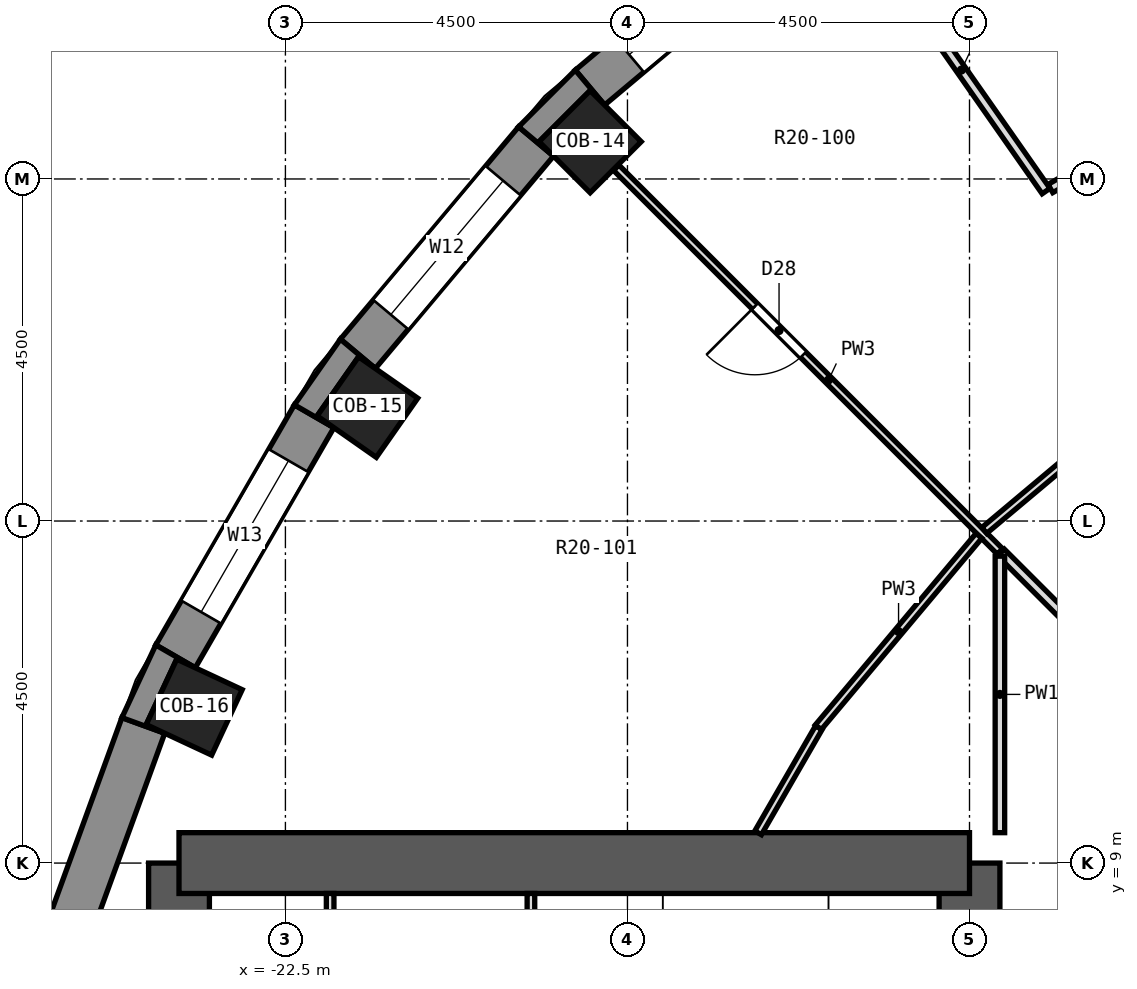
"""IFC4 building model, lengths in metres.
Left out: names, types, materials, properties, quantities, classifications, styles, units other than length and angle.
Written with IfcOpenShell. Run it as: python <this file> out.ifc"""

import sys

from ifc_helpers import new_model, si_unit, direction, frame, frame_2d, origin, origin_2d, place, context, subcontext, project, spatial, polyline, rectangle, outline, extrude, element, fill, save


model = new_model("IFC4")
c1 = context("Model", 3, precision=1e-05, world=origin(), true_north=direction((0.0, 1.0)))
c2 = subcontext(c1, "Body", "Model", "MODEL_VIEW")
j1 = project(units=[si_unit("LENGTHUNIT", "METRE"), si_unit("PLANEANGLEUNIT", "RADIAN")], contexts=[c1])
p1 = place(None, origin())
s1 = spatial("IfcSite", under=j1, at=p1, CompositionType="ELEMENT")
p2 = place(p1, origin())
s2 = spatial("IfcBuilding", under=s1, at=p2, CompositionType="ELEMENT")
p3 = place(p2, frame((0.0, 0.0, 121.6)))
s3 = spatial("IfcBuildingStorey", under=s2, at=p3, CompositionType="ELEMENT", Elevation=121.6)
for number, where, z_axis, x_axis in (
    (1, (-18.491, 18.491, 0.0), (0.0, 0.0, 1.0), (-0.707, 0.707, 0.0)),
    (2, (-21.421, 14.999, 0.0), (0.0, 0.0, 1.0), (-0.819, 0.574, 0.0)),
    (3, (-23.7, 11.052, 0.0), (0.0, 0.0, 1.0), (-0.906, 0.423, 0.0)),
):
    element("IfcColumn", number, at=place(p3, frame(where, z_axis=z_axis, x_axis=x_axis)), inside=s3, PredefinedType="COLUMN", context=c2, shape_type="SweptSolid", body=[
        extrude(rectangle(XDim=0.95, YDim=0.95, at=origin_2d()), origin(), (0.0, 0.0, 1.0), 3.3),
    ])
p4 = place(p3, frame((-13.5, -9.0, 0.0), z_axis=(0.0, 0.0, 1.0), x_axis=(0.0, 1.0, 0.0)))
e4 = element("IfcWall", 4, at=p4, inside=s3, PredefinedType="SHEAR", context=c2, shape_type="SweptSolid", body=[
    extrude(rectangle(XDim=18.0, YDim=0.8, at=frame_2d((9.0, 0.0))), origin(), (0.0, 0.0, 1.0), 3.3),
])
p5 = place(p4, frame((15.4, 0.0, 0.0)))
e5 = element("IfcOpeningElement", 5, at=p5, cuts=e4, PredefinedType="OPENING", context=c2, shape_type="SweptSolid", body=[
    extrude(rectangle(XDim=1.2, YDim=2.1, at=frame_2d((0.6, 1.05))), frame((0.0, 0.412, 0.0), z_axis=(0.0, -1.0, 0.0), x_axis=(1.0, 0.0, 0.0)), (0.0, 0.0, 1.0), 0.824),
])
p6 = place(p4, frame((1.4, 0.0, 0.0)))
e6 = element("IfcOpeningElement", 6, at=p6, cuts=e4, PredefinedType="OPENING", context=c2, shape_type="SweptSolid", body=[
    extrude(rectangle(XDim=1.2, YDim=2.1, at=frame_2d((0.6, 1.05))), frame((0.0, 0.412, 0.0), z_axis=(0.0, -1.0, 0.0), x_axis=(1.0, 0.0, 0.0)), (0.0, 0.0, 1.0), 0.824),
])
p7 = place(p4, frame((7.5, 0.0, 0.0)))
e7 = element("IfcOpeningElement", 7, at=p7, cuts=e4, PredefinedType="OPENING", context=c2, shape_type="SweptSolid", body=[
    extrude(rectangle(XDim=3.0, YDim=2.4, at=frame_2d((1.5, 1.2))), frame((0.0, 0.412, 0.0), z_axis=(0.0, -1.0, 0.0), x_axis=(1.0, 0.0, 0.0)), (0.0, 0.0, 1.0), 0.824),
])
p8 = place(p3, frame((-23.9, -9.0, 0.0), z_axis=(0.0, 0.0, 1.0), x_axis=(0.0, 1.0, 0.0)))
e8 = element("IfcWall", 8, at=p8, inside=s3, PredefinedType="SHEAR", context=c2, shape_type="SweptSolid", body=[
    extrude(rectangle(XDim=18.0, YDim=0.8, at=frame_2d((9.0, 0.0))), origin(), (0.0, 0.0, 1.0), 3.3),
])
p9 = place(p3, frame((-13.5, 9.0, 0.0), z_axis=(0.0, 0.0, 1.0), x_axis=(-1.0, 0.0, 0.0)))
e9 = element("IfcWall", 9, at=p9, inside=s3, PredefinedType="SHEAR", context=c2, shape_type="SweptSolid", body=[
    extrude(rectangle(XDim=10.4, YDim=0.8, at=frame_2d((5.2, 0.0))), origin(), (0.0, 0.0, 1.0), 3.3),
])
p10 = place(p3, frame((-15.699, 21.547, 0.0), z_axis=(0.0, 0.0, 1.0), x_axis=(-0.766055462616, -0.642774476932, 0.0)))
e10 = element("IfcWall", 10, at=p10, inside=s3, PredefinedType="SOLIDWALL", context=c2, shape_type="SweptSolid", body=[
    extrude(rectangle(XDim=3.648, YDim=0.6, at=frame_2d((1.824, 0.0))), origin(), (0.0, 0.0, 1.0), 2.8),
])
p11 = place(p10, frame((0.674, 0.0, 0.9)))
e11 = element("IfcOpeningElement", 11, at=p11, cuts=e10, PredefinedType="OPENING", context=c2, shape_type="SweptSolid", body=[
    extrude(rectangle(XDim=2.3, YDim=1.8, at=frame_2d((1.15, 0.9))), frame((0.0, 0.312, 0.0), z_axis=(0.0, -1.0, 0.0), x_axis=(1.0, 0.0, 0.0)), (0.0, 0.0, 1.0), 0.624),
])
p12 = place(p3, frame((-19.202, 18.494, 0.0), z_axis=(0.0, 0.0, 1.0), x_axis=(-0.642774476932, -0.766055462616, 0.0)))
e12 = element("IfcWall", 12, at=p12, inside=s3, PredefinedType="SOLIDWALL", context=c2, shape_type="SweptSolid", body=[
    extrude(rectangle(XDim=3.648, YDim=0.6, at=frame_2d((1.824, 0.0))), origin(), (0.0, 0.0, 1.0), 2.8),
])
p13 = place(p12, frame((0.674, 0.0, 0.9)))
e13 = element("IfcOpeningElement", 13, at=p13, cuts=e12, PredefinedType="OPENING", context=c2, shape_type="SweptSolid", body=[
    extrude(rectangle(XDim=2.3, YDim=1.8, at=frame_2d((1.15, 0.9))), frame((0.0, 0.312, 0.0), z_axis=(0.0, -1.0, 0.0), x_axis=(1.0, 0.0, 0.0)), (0.0, 0.0, 1.0), 0.624),
])
p14 = place(p3, frame((-22.122, 14.878, 0.0), z_axis=(0.0, 0.0, 1.0), x_axis=(-0.499954196102, -0.866051847062, 0.0)))
e14 = element("IfcWall", 14, at=p14, inside=s3, PredefinedType="SOLIDWALL", context=c2, shape_type="SweptSolid", body=[
    extrude(rectangle(XDim=3.648, YDim=0.6, at=frame_2d((1.824, 0.0))), origin(), (0.0, 0.0, 1.0), 2.8),
])
p15 = place(p14, frame((0.674, 0.0, 0.9)))
e15 = element("IfcOpeningElement", 15, at=p15, cuts=e14, PredefinedType="OPENING", context=c2, shape_type="SweptSolid", body=[
    extrude(rectangle(XDim=2.3, YDim=1.8, at=frame_2d((1.15, 0.9))), frame((0.0, 0.312, 0.0), z_axis=(0.0, -1.0, 0.0), x_axis=(1.0, 0.0, 0.0)), (0.0, 0.0, 1.0), 0.624),
])
p16 = place(p3, frame((-24.369, 10.811, 0.0), z_axis=(0.0, 0.0, 1.0), x_axis=(-0.341990236633, -0.939703505393, 0.0)))
e16 = element("IfcWall", 16, at=p16, inside=s3, PredefinedType="SOLIDWALL", context=c2, shape_type="SweptSolid", body=[
    extrude(rectangle(XDim=3.648, YDim=0.6, at=frame_2d((1.824, 0.0))), origin(), (0.0, 0.0, 1.0), 2.8),
])
p17 = place(p3, origin())
e17 = element("IfcWall", 17, at=p17, inside=s3, PredefinedType="SOLIDWALL", context=c2, shape_type="SweptSolid", body=[
    extrude(outline(polyline([(-18.686, 19.432), (-19.432, 18.686), (-18.972, 18.301), (-19.163, 18.491), (-18.491, 19.163), (-18.301, 18.972), (-18.686, 19.432)])), origin(), (0.0, 0.0, 1.0), 2.8),
])
p18 = place(p3, origin())
e18 = element("IfcWall", 18, at=p18, inside=s3, PredefinedType="SOLIDWALL", context=c2, shape_type="SweptSolid", body=[
    extrude(outline(polyline([(-22.382, 15.028), (-21.862, 14.728), (-22.083, 14.882), (-21.538, 15.661), (-21.317, 15.506), (-21.777, 15.892), (-22.382, 15.028)])), origin(), (0.0, 0.0, 1.0), 2.8),
])
p19 = place(p3, origin())
e19 = element("IfcWall", 19, at=p19, inside=s3, PredefinedType="SOLIDWALL", context=c2, shape_type="SweptSolid", body=[
    extrude(outline(polyline([(-24.651, 10.913), (-24.087, 10.708), (-24.331, 10.822), (-23.93, 11.683), (-23.686, 11.569), (-24.206, 11.869), (-24.651, 10.913)])), origin(), (0.0, 0.0, 1.0), 2.8),
])
p20 = place(p3, frame((-14.721, 21.024, 0.0), z_axis=(0.0, 0.0, 1.0), x_axis=(0.573453908861, -0.819237825306, 0.0)))
e20 = element("IfcWall", 20, at=p20, inside=s3, PredefinedType="PARTITIONING", context=c2, shape_type="SweptSolid", body=[
    extrude(rectangle(XDim=3.885, YDim=0.125, at=frame_2d((1.942, 0.0))), origin(), (0.0, 0.0, 1.0), 2.8),
])
p21 = place(p3, frame((-18.148, 18.148, 0.0), z_axis=(0.0, 0.0, 1.0), x_axis=(0.707106781187, -0.707106781187, 0.0)))
e21 = element("IfcWall", 21, at=p21, inside=s3, PredefinedType="PARTITIONING", context=c2, shape_type="SweptSolid", body=[
    extrude(rectangle(XDim=7.139, YDim=0.1, at=frame_2d((3.569, 0.0))), origin(), (0.0, 0.0, 1.0), 2.8),
])
p22 = place(p21, frame((2.58, 0.0, 0.0)))
e22 = element("IfcOpeningElement", 22, at=p22, cuts=e21, PredefinedType="OPENING", context=c2, shape_type="SweptSolid", body=[
    extrude(rectangle(XDim=0.9, YDim=2.1, at=frame_2d((0.45, 1.05))), frame((0.0, 0.062, 0.0), z_axis=(0.0, -1.0, 0.0), x_axis=(1.0, 0.0, 0.0)), (0.0, 0.0, 1.0), 0.124),
])
p23 = place(p3, frame((-13.086, 13.086, 0.0), z_axis=(0.0, 0.0, 1.0), x_axis=(0.707208486583, -0.707005061159, 0.0)))
e23 = element("IfcWall", 23, at=p23, inside=s3, PredefinedType="PARTITIONING", context=c2, shape_type="SweptSolid", body=[
    extrude(rectangle(XDim=7.201, YDim=0.125, at=frame_2d((3.601, 0.0))), origin(), (0.0, 0.0, 1.0), 2.8),
])
p24 = place(p23, frame((3.126, 0.0, 0.0)))
e24 = element("IfcOpeningElement", 24, at=p24, cuts=e23, PredefinedType="OPENING", context=c2, shape_type="SweptSolid", body=[
    extrude(rectangle(XDim=1.0, YDim=2.1, at=frame_2d((0.5, 1.05))), frame((0.0, 0.074, 0.0), z_axis=(0.0, -1.0, 0.0), x_axis=(1.0, 0.0, 0.0)), (0.0, 0.0, 1.0), 0.149),
])
p25 = place(p3, frame((-12.435, 17.874, 0.0), z_axis=(0.0, 0.0, 1.0), x_axis=(0.866056109487, 0.499946812391, 0.0)))
e25 = element("IfcWall", 25, at=p25, inside=s3, PredefinedType="PARTITIONING", context=c2, shape_type="SweptSolid", body=[
    extrude(rectangle(XDim=1.476, YDim=0.125, at=frame_2d((0.738, 0.0))), origin(), (0.0, 0.0, 1.0), 2.8),
])
p26 = place(p25, frame((0.293, 0.0, 0.0)))
e26 = element("IfcOpeningElement", 26, at=p26, cuts=e25, PredefinedType="OPENING", context=c2, shape_type="SweptSolid", body=[
    extrude(rectangle(XDim=0.9, YDim=2.1, at=frame_2d((0.45, 1.05))), frame((0.0, 0.074, 0.0), z_axis=(0.0, -1.0, 0.0), x_axis=(1.0, 0.0, 0.0)), (0.0, 0.0, 1.0), 0.149),
])
p27 = place(p3, frame((-13.306, 13.376, 0.0), z_axis=(0.0, 0.0, 1.0), x_axis=(0.766146553843, 0.642665899232, 0.0)))
e27 = element("IfcWall", 27, at=p27, inside=s3, PredefinedType="PARTITIONING", context=c2, shape_type="SweptSolid", body=[
    extrude(rectangle(XDim=3.189, YDim=0.1, at=frame_2d((1.595, 0.0))), origin(), (0.0, 0.0, 1.0), 2.8),
])
p28 = place(p3, frame((-15.491, 10.785, 0.0), z_axis=(0.0, 0.0, 1.0), x_axis=(0.642706409745, 0.766112570627, 0.0)))
e28 = element("IfcWall", 28, at=p28, inside=s3, PredefinedType="PARTITIONING", context=c2, shape_type="SweptSolid", body=[
    extrude(rectangle(XDim=3.29, YDim=0.1, at=frame_2d((1.645, 0.0))), origin(), (0.0, 0.0, 1.0), 2.8),
])
p29 = place(p3, frame((-16.281, 9.398, 0.0), z_axis=(0.0, 0.0, 1.0), x_axis=(0.499872473806, 0.866099018549, 0.0)))
e29 = element("IfcWall", 29, at=p29, inside=s3, PredefinedType="PARTITIONING", context=c2, shape_type="SweptSolid", body=[
    extrude(rectangle(XDim=1.597, YDim=0.1, at=frame_2d((0.798, 0.0))), origin(), (0.0, 0.0, 1.0), 2.8),
])
p30 = place(p3, frame((-13.1, 9.4, 0.0), z_axis=(0.0, 0.0, 1.0), x_axis=(0.0, 1.0, 0.0)))
e30 = element("IfcWall", 30, at=p30, inside=s3, PredefinedType="PARTITIONING", context=c2, shape_type="SweptSolid", body=[
    extrude(rectangle(XDim=3.638, YDim=0.125, at=frame_2d((1.819, 0.0))), origin(), (0.0, 0.0, 1.0), 2.8),
])
p31 = place(p3, frame((-19.27, 5.25, 0.0), z_axis=(0.0, 0.0, 1.0), x_axis=(0.0, 1.0, 0.0)))
e31 = element("IfcWall", 31, at=p31, inside=s3, PredefinedType="PARTITIONING", context=c2, shape_type="SweptSolid", body=[
    extrude(rectangle(XDim=3.35, YDim=0.1, at=frame_2d((1.675, 0.0))), origin(), (0.0, 0.0, 1.0), 2.8),
])
p32 = place(p3, frame((-21.912, 5.25, 0.0), z_axis=(0.0, 0.0, 1.0), x_axis=(0.0, 1.0, 0.0)))
e32 = element("IfcWall", 32, at=p32, inside=s3, PredefinedType="PARTITIONING", context=c2, shape_type="SweptSolid", body=[
    extrude(rectangle(XDim=3.35, YDim=0.1, at=frame_2d((1.675, 0.0))), origin(), (0.0, 0.0, 1.0), 2.8),
])
p33 = place(p32, frame((1.225, 0.0, 0.0)))
e33 = element("IfcOpeningElement", 33, at=p33, cuts=e32, PredefinedType="OPENING", context=c2, shape_type="SweptSolid", body=[
    extrude(rectangle(XDim=0.9, YDim=2.1, at=frame_2d((0.45, 1.05))), frame((0.0, 0.062, 0.0), z_axis=(0.0, -1.0, 0.0), x_axis=(1.0, 0.0, 0.0)), (0.0, 0.0, 1.0), 0.124),
])
p34 = place(p11, origin())
e34 = element("IfcWindow", 34, at=p34, inside=s3, PartitioningType="SINGLE_PANEL", PredefinedType="WINDOW", context=c2, shape_type="SweptSolid", body=[
    extrude(rectangle(XDim=2.3, YDim=1.8, at=frame_2d((1.15, 0.9))), frame((0.0, 0.18, 0.0), z_axis=(0.0, -1.0, 0.0), x_axis=(1.0, 0.0, 0.0)), (0.0, 0.0, 1.0), 0.06),
])
fill(e11, e34)
p35 = place(p13, origin())
e35 = element("IfcWindow", 35, at=p35, inside=s3, PartitioningType="SINGLE_PANEL", PredefinedType="WINDOW", context=c2, shape_type="SweptSolid", body=[
    extrude(rectangle(XDim=2.3, YDim=1.8, at=frame_2d((1.15, 0.9))), frame((0.0, 0.18, 0.0), z_axis=(0.0, -1.0, 0.0), x_axis=(1.0, 0.0, 0.0)), (0.0, 0.0, 1.0), 0.06),
])
fill(e13, e35)
p36 = place(p15, origin())
e36 = element("IfcWindow", 36, at=p36, inside=s3, PartitioningType="SINGLE_PANEL", PredefinedType="WINDOW", context=c2, shape_type="SweptSolid", body=[
    extrude(rectangle(XDim=2.3, YDim=1.8, at=frame_2d((1.15, 0.9))), frame((0.0, 0.18, 0.0), z_axis=(0.0, -1.0, 0.0), x_axis=(1.0, 0.0, 0.0)), (0.0, 0.0, 1.0), 0.06),
])
fill(e15, e36)
p37 = place(p22, frame((0.9, 0.0, 0.0), z_axis=(0.0, 0.0, 1.0), x_axis=(-1.0, 0.0, 0.0)))
e37 = element("IfcDoor", 37, at=p37, inside=s3, OperationType="SINGLE_SWING_RIGHT", PredefinedType="DOOR", context=c2, shape_type="SweptSolid", body=[
    extrude(rectangle(XDim=0.9, YDim=2.1, at=frame_2d((0.45, 1.05))), frame((0.0, 0.025, 0.0), z_axis=(0.0, -1.0, 0.0), x_axis=(1.0, 0.0, 0.0)), (0.0, 0.0, 1.0), 0.05),
])
fill(e22, e37)
save(model, sys.argv[1])
